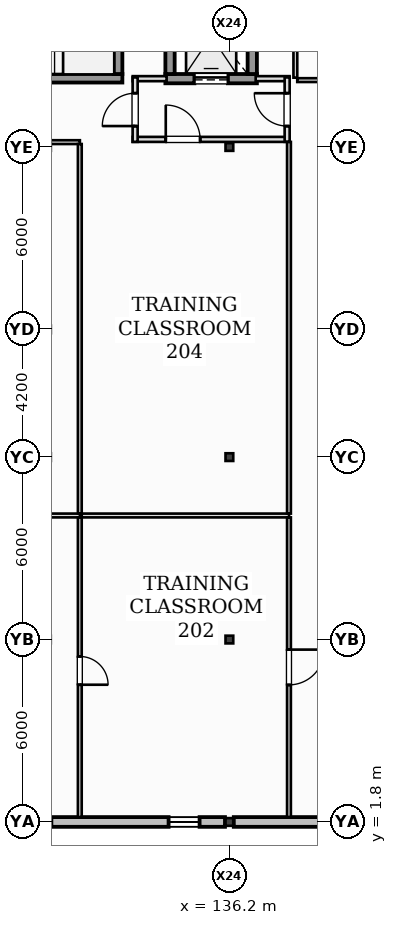
"""IFC4 building model, lengths in metres.
Left out: names, types, materials, properties, quantities, classifications, styles, units other than length and angle.
Written with IfcOpenShell. Run it as: python <this file> out.ifc"""

import sys

from ifc_helpers import new_model, si_unit, direction, frame, frame_2d, origin, origin_2d, place, context, subcontext, project, spatial, rectangle, hollow_rectangle, i_section, extrude, element, fill, save


model = new_model("IFC4")
c1 = context("Model", 3, precision=1e-05, world=origin(), true_north=direction((0.0, 1.0)))
c2 = subcontext(c1, "Body", "Model", "MODEL_VIEW")
j1 = project(units=[si_unit("LENGTHUNIT", "METRE"), si_unit("PLANEANGLEUNIT", "RADIAN")], contexts=[c1])
p1 = place(None, origin())
s1 = spatial("IfcSite", under=j1, at=p1, CompositionType="ELEMENT")
p2 = place(p1, origin())
s2 = spatial("IfcBuilding", under=s1, at=p2, CompositionType="ELEMENT")
p3 = place(p2, frame((0.0, 0.0, 6.0)))
s3 = spatial("IfcBuildingStorey", under=s2, at=p3, CompositionType="ELEMENT", Elevation=6.0)
for number, where, z_axis, x_axis in (
    (1, (136.2, 1.8, 0.0), (0.0, 0.0, 1.0), (1.0, 0.0, 0.0)),
    (2, (136.2, 7.8, 0.0), (0.0, 0.0, 1.0), (1.0, 0.0, 0.0)),
    (3, (136.2, 13.8, 0.0), (0.0, 0.0, 1.0), (1.0, 0.0, 0.0)),
):
    element("IfcColumn", number, at=place(p3, frame(where, z_axis=z_axis, x_axis=x_axis)), inside=s3, PredefinedType="COLUMN", context=c2, shape_type="SweptSolid", body=[
        extrude(i_section(OverallWidth=0.254, OverallDepth=0.253, WebThickness=0.009, FlangeThickness=0.014, at=origin_2d()), origin(), (0.0, 0.0, 1.0), 4.0),
    ])
p4 = place(p3, frame((136.2, 18.0, 0.0), z_axis=(0.0, 0.0, 1.0), x_axis=(1.0, 0.0, 0.0)))
e4 = element("IfcColumn", 4, at=p4, inside=s3, PredefinedType="COLUMN", context=c2, shape_type="SweptSolid", body=[
    extrude(hollow_rectangle(XDim=0.25, YDim=0.25, WallThickness=0.012, at=origin_2d()), origin(), (0.0, 0.0, 1.0), 4.0),
])
p5 = place(p3, frame((136.2, 24.0, 0.0), z_axis=(0.0, 0.0, 1.0), x_axis=(1.0, 0.0, 0.0)))
e5 = element("IfcColumn", 5, at=p5, inside=s3, PredefinedType="COLUMN", context=c2, shape_type="SweptSolid", body=[
    extrude(i_section(OverallWidth=0.254, OverallDepth=0.253, WebThickness=0.009, FlangeThickness=0.014, at=origin_2d()), origin(), (0.0, 0.0, 1.0), 4.0),
])
p6 = place(p3, frame((130.345, 1.8, 0.0), z_axis=(0.0, 0.0, 1.0), x_axis=(1.0, 0.0, 0.0)))
e6 = element("IfcWall", 6, at=p6, inside=s3, PredefinedType="STANDARD", context=c2, shape_type="SweptSolid", body=[
    extrude(rectangle(XDim=5.71, YDim=0.32, at=frame_2d((2.855, 0.0))), origin(), (0.0, 0.0, 1.0), 3.223),
])
p7 = place(p6, frame((3.855, 0.0, 1.28)))
e7 = element("IfcOpeningElement", 7, at=p7, cuts=e6, PredefinedType="OPENING", context=c2, shape_type="SweptSolid", body=[
    extrude(rectangle(XDim=1.02, YDim=1.02, at=frame_2d((0.51, 0.51))), frame((0.0, 0.17, 0.0), z_axis=(0.0, -1.0, 0.0), x_axis=(1.0, 0.0, 0.0)), (0.0, 0.0, 1.0), 0.34),
])
p8 = place(p3, frame((136.345, 1.8, 0.0), z_axis=(0.0, 0.0, 1.0), x_axis=(1.0, 0.0, 0.0)))
e8 = element("IfcWall", 8, at=p8, inside=s3, PredefinedType="STANDARD", context=c2, shape_type="SweptSolid", body=[
    extrude(rectangle(XDim=5.71, YDim=0.32, at=frame_2d((2.855, 0.0))), origin(), (0.0, 0.0, 1.0), 3.223),
])
p9 = place(p8, frame((3.504, 0.0, 0.86)))
e9 = element("IfcOpeningElement", 9, at=p9, cuts=e8, PredefinedType="OPENING", context=c2, shape_type="SweptSolid", body=[
    extrude(rectangle(XDim=1.08, YDim=1.08, at=frame_2d((0.54, 0.54))), frame((0.0, 0.17, 0.0), z_axis=(0.0, -1.0, 0.0), x_axis=(1.0, 0.0, 0.0)), (0.0, 0.0, 1.0), 0.34),
])
p10 = place(p3, frame((124.52, 26.26, 0.0), z_axis=(0.0, 0.0, 1.0), x_axis=(1.0, 0.0, 0.0)))
e10 = element("IfcWall", 10, at=p10, inside=s3, PredefinedType="SHEAR", context=c2, shape_type="SweptSolid", body=[
    extrude(rectangle(XDim=8.16, YDim=0.28, at=frame_2d((4.08, 0.0))), origin(), (0.0, 0.0, 1.0), 4.0),
])
p11 = place(p10, frame((0.65, 0.0, 0.0)))
e11 = element("IfcOpeningElement", 11, at=p11, cuts=e10, PredefinedType="OPENING", context=c2, shape_type="SweptSolid", body=[
    extrude(rectangle(XDim=0.98, YDim=2.15, at=frame_2d((0.49, 1.075))), frame((0.0, 0.15, 0.0), z_axis=(0.0, -1.0, 0.0), x_axis=(1.0, 0.0, 0.0)), (0.0, 0.0, 1.0), 0.3),
])
p12 = place(p3, frame((132.54, 26.4, 0.0), z_axis=(0.0, 0.0, 1.0), x_axis=(0.0, 1.0, 0.0)))
e12 = element("IfcWall", 12, at=p12, inside=s3, PredefinedType="SHEAR", context=c2, shape_type="SweptSolid", body=[
    extrude(rectangle(XDim=3.0, YDim=0.28, at=frame_2d((1.5, 0.0))), origin(), (0.0, 0.0, 1.0), 4.0),
])
p13 = place(p3, frame((134.095, 26.248, 0.0), z_axis=(0.0, 0.0, 1.0), x_axis=(1.0, 0.0, 0.0)))
e13 = element("IfcWall", 13, at=p13, inside=s3, PredefinedType="SHEAR", context=c2, shape_type="SweptSolid", body=[
    extrude(rectangle(XDim=3.01, YDim=0.305, at=frame_2d((1.505, 0.0))), origin(), (0.0, 0.0, 1.0), 4.0),
])
p14 = place(p13, frame((0.955, 0.0, 0.0)))
e14 = element("IfcOpeningElement", 14, at=p14, cuts=e13, PredefinedType="OPENING", context=c2, shape_type="SweptSolid", body=[
    extrude(rectangle(XDim=1.1, YDim=2.15, at=frame_2d((0.55, 1.075))), frame((0.0, 0.162, 0.0), z_axis=(0.0, -1.0, 0.0), x_axis=(1.0, 0.0, 0.0)), (0.0, 0.0, 1.0), 0.325),
])
for number, where, z_axis, x_axis in (
    (15, (134.248, 29.4, 0.0), (0.0, 0.0, 1.0), (0.0, -1.0, 0.0)),
    (16, (136.952, 26.4, 0.0), (0.0, 0.0, 1.0), (0.0, 1.0, 0.0)),
):
    element("IfcWall", number, at=place(p3, frame(where, z_axis=z_axis, x_axis=x_axis)), inside=s3, PredefinedType="SHEAR", context=c2, shape_type="SweptSolid", body=[
        extrude(rectangle(XDim=3.0, YDim=0.305, at=frame_2d((1.5, 0.0))), origin(), (0.0, 0.0, 1.0), 4.0),
    ])
p15 = place(p3, frame((133.02, 24.25, 0.0), z_axis=(0.0, 0.0, 1.0), x_axis=(1.0, 0.0, 0.0)))
e17 = element("IfcWall", 17, at=p15, inside=s3, PredefinedType="PARTITIONING", context=c2, shape_type="SweptSolid", body=[
    extrude(rectangle(XDim=5.16, YDim=0.165, at=frame_2d((2.58, 0.0))), origin(), (0.0, 0.0, 1.0), 3.153),
])
p16 = place(p15, frame((1.087, 0.0, 0.0)))
e18 = element("IfcOpeningElement", 18, at=p16, cuts=e17, PredefinedType="OPENING", context=c2, shape_type="SweptSolid", body=[
    extrude(rectangle(XDim=1.13, YDim=2.18, at=frame_2d((0.565, 1.09))), frame((0.0, 0.093, 0.0), z_axis=(0.0, -1.0, 0.0), x_axis=(1.0, 0.0, 0.0)), (0.0, 0.0, 1.0), 0.185),
])
for number, where, z_axis, x_axis in (
    (19, (133.02, 26.248, 0.0), (0.0, 0.0, 1.0), (1.0, 0.0, 0.0)),
    (20, (137.065, 26.248, 0.0), (0.0, 0.0, 1.0), (1.0, 0.0, 0.0)),
):
    element("IfcWall", number, at=place(p3, frame(where, z_axis=z_axis, x_axis=x_axis)), inside=s3, PredefinedType="PARTITIONING", context=c2, shape_type="SweptSolid", body=[
        extrude(rectangle(XDim=1.115, YDim=0.165, at=frame_2d((0.558, 0.0))), origin(), (0.0, 0.0, 1.0), 3.72),
    ])
p17 = place(p3, frame((133.1, 24.17, 0.0), z_axis=(0.0, 0.0, 1.0), x_axis=(0.0, 1.0, 0.0)))
e21 = element("IfcWall", 21, at=p17, inside=s3, PredefinedType="PARTITIONING", context=c2, shape_type="SweptSolid", body=[
    extrude(rectangle(XDim=2.118, YDim=0.165, at=frame_2d((1.059, 0.0))), origin(), (0.0, 0.0, 1.0), 3.72),
])
p18 = place(p17, frame((0.519, 0.0, 0.0)))
e22 = element("IfcOpeningElement", 22, at=p18, cuts=e21, PredefinedType="OPENING", context=c2, shape_type="SweptSolid", body=[
    extrude(rectangle(XDim=1.08, YDim=2.14, at=frame_2d((0.54, 1.07))), frame((0.0, 0.093, 0.0), z_axis=(0.0, -1.0, 0.0), x_axis=(1.0, 0.0, 0.0)), (0.0, 0.0, 1.0), 0.185),
])
p19 = place(p3, frame((138.1, 24.17, 0.0), z_axis=(0.0, 0.0, 1.0), x_axis=(0.0, 1.0, 0.0)))
e23 = element("IfcWall", 23, at=p19, inside=s3, PredefinedType="PARTITIONING", context=c2, shape_type="SweptSolid", body=[
    extrude(rectangle(XDim=2.118, YDim=0.165, at=frame_2d((1.059, 0.0))), origin(), (0.0, 0.0, 1.0), 3.379),
])
p20 = place(p19, frame((0.519, 0.0, 0.0)))
e24 = element("IfcOpeningElement", 24, at=p20, cuts=e23, PredefinedType="OPENING", context=c2, shape_type="SweptSolid", body=[
    extrude(rectangle(XDim=1.08, YDim=2.14, at=frame_2d((0.54, 1.07))), frame((0.0, 0.093, 0.0), z_axis=(0.0, -1.0, 0.0), x_axis=(1.0, 0.0, 0.0)), (0.0, 0.0, 1.0), 0.185),
])
p21 = place(p3, frame((124.36, 11.88, 0.0), z_axis=(0.0, 0.0, 1.0), x_axis=(1.0, 0.0, 0.0)))
e25 = element("IfcWall", 25, at=p21, inside=s3, PredefinedType="PARTITIONING", context=c2, shape_type="SweptSolid", body=[
    extrude(rectangle(XDim=6.922, YDim=0.125, at=frame_2d((3.461, 0.0))), origin(), (0.0, 0.0, 1.0), 3.72),
])
p22 = place(p3, frame((131.28, 11.817, 0.0), z_axis=(0.0, 0.0, 1.0), x_axis=(0.0, -1.0, 0.0)))
e26 = element("IfcWall", 26, at=p22, inside=s3, PredefinedType="PARTITIONING", context=c2, shape_type="SweptSolid", body=[
    extrude(rectangle(XDim=9.857, YDim=0.125, at=frame_2d((4.929, 0.0))), origin(), (0.0, 0.0, 1.0), 3.72),
])
p23 = place(p22, frame((4.574, 0.0, 0.0)))
e27 = element("IfcOpeningElement", 27, at=p23, cuts=e26, PredefinedType="OPENING", context=c2, shape_type="SweptSolid", body=[
    extrude(rectangle(XDim=0.93, YDim=2.1, at=frame_2d((0.465, 1.05))), frame((0.0, 0.073, 0.0), z_axis=(0.0, -1.0, 0.0), x_axis=(1.0, 0.0, 0.0)), (0.0, 0.0, 1.0), 0.145),
])
p24 = place(p3, frame((131.343, 11.88, 0.0), z_axis=(0.0, 0.0, 1.0), x_axis=(1.0, 0.0, 0.0)))
e28 = element("IfcWall", 28, at=p24, inside=s3, PredefinedType="PARTITIONING", context=c2, shape_type="SweptSolid", body=[
    extrude(rectangle(XDim=6.82, YDim=0.125, at=frame_2d((3.41, 0.0))), origin(), (0.0, 0.0, 1.0), 3.72),
])
p25 = place(p3, frame((138.16, 11.817, 0.0), z_axis=(0.0, 0.0, 1.0), x_axis=(0.0, -1.0, 0.0)))
e29 = element("IfcWall", 29, at=p25, inside=s3, PredefinedType="PARTITIONING", context=c2, shape_type="SweptSolid", body=[
    extrude(rectangle(XDim=9.857, YDim=0.125, at=frame_2d((4.929, 0.0))), origin(), (0.0, 0.0, 1.0), 3.449),
])
p26 = place(p25, frame((4.349, 0.0, 0.0)))
e30 = element("IfcOpeningElement", 30, at=p26, cuts=e29, PredefinedType="OPENING", context=c2, shape_type="SweptSolid", body=[
    extrude(rectangle(XDim=1.16, YDim=2.2, at=frame_2d((0.58, 1.1))), frame((0.0, 0.073, 0.0), z_axis=(0.0, -1.0, 0.0), x_axis=(1.0, 0.0, 0.0)), (0.0, 0.0, 1.0), 0.145),
])
p27 = place(p3, frame((124.417, 24.16, 0.0), z_axis=(0.0, 0.0, 1.0), x_axis=(1.0, 0.0, 0.0)))
e31 = element("IfcWall", 31, at=p27, inside=s3, PredefinedType="PARTITIONING", context=c2, shape_type="SweptSolid", body=[
    extrude(rectangle(XDim=6.865, YDim=0.125, at=frame_2d((3.433, 0.0))), origin(), (0.0, 0.0, 1.0), 3.153),
])
p28 = place(p27, frame((2.87, 0.0, 0.0)))
e32 = element("IfcOpeningElement", 32, at=p28, cuts=e31, PredefinedType="OPENING", context=c2, shape_type="SweptSolid", body=[
    extrude(rectangle(XDim=0.9, YDim=2.1, at=frame_2d((0.45, 1.05))), frame((0.0, 0.073, 0.0), z_axis=(0.0, -1.0, 0.0), x_axis=(1.0, 0.0, 0.0)), (0.0, 0.0, 1.0), 0.145),
])
p29 = place(p3, frame((131.28, 24.097, 0.0), z_axis=(0.0, 0.0, 1.0), x_axis=(0.0, -1.0, 0.0)))
e33 = element("IfcWall", 33, at=p29, inside=s3, PredefinedType="PARTITIONING", context=c2, shape_type="SweptSolid", body=[
    extrude(rectangle(XDim=12.155, YDim=0.125, at=frame_2d((6.078, 0.0))), origin(), (0.0, 0.0, 1.0), 3.72),
])
p30 = place(p3, frame((138.16, 24.167, 0.0), z_axis=(0.0, 0.0, 1.0), x_axis=(0.0, -1.0, 0.0)))
e34 = element("IfcWall", 34, at=p30, inside=s3, PredefinedType="PARTITIONING", context=c2, shape_type="SweptSolid", body=[
    extrude(rectangle(XDim=12.225, YDim=0.125, at=frame_2d((6.113, 0.0))), origin(), (0.0, 0.0, 1.0), 3.289),
])
p31 = place(p3, frame((138.37, 26.28, 0.0), z_axis=(0.0, 0.0, 1.0), x_axis=(0.0, 1.0, 0.0)))
e35 = element("IfcWall", 35, at=p31, inside=s3, PredefinedType="PARTITIONING", context=c2, shape_type="SweptSolid", body=[
    extrude(rectangle(XDim=3.56, YDim=0.125, at=frame_2d((1.78, 0.0))), origin(), (0.0, 0.0, 1.0), 3.379),
])
p32 = place(p3, frame((157.72, 26.2, 0.0), z_axis=(0.0, 0.0, 1.0), x_axis=(-1.0, 0.0, 0.0)))
e36 = element("IfcWall", 36, at=p32, inside=s3, PredefinedType="PARTITIONING", context=c2, shape_type="SweptSolid", body=[
    extrude(rectangle(XDim=19.287, YDim=0.125, at=frame_2d((9.644, 0.0))), origin(), (0.0, 0.0, 1.0), 3.72),
])
p33 = place(p32, frame((9.018, 0.0, 0.0)))
e37 = element("IfcOpeningElement", 37, at=p33, cuts=e36, PredefinedType="OPENING", context=c2, shape_type="SweptSolid", body=[
    extrude(rectangle(XDim=1.03, YDim=2.15, at=frame_2d((0.515, 1.075))), frame((0.0, 0.073, 0.0), z_axis=(0.0, -1.0, 0.0), x_axis=(1.0, 0.0, 0.0)), (0.0, 0.0, 1.0), 0.145),
])
p34 = place(p7, origin())
e38 = element("IfcWindow", 38, at=p34, inside=s3, PartitioningType="SINGLE_PANEL", PredefinedType="WINDOW", context=c2, shape_type="SweptSolid", body=[
    extrude(rectangle(XDim=1.02, YDim=1.02, at=frame_2d((0.51, 0.51))), frame((0.0, 0.03, 0.0), z_axis=(0.0, -1.0, 0.0), x_axis=(1.0, 0.0, 0.0)), (0.0, 0.0, 1.0), 0.06),
])
fill(e7, e38)
p35 = place(p14, origin())
e39 = element("IfcDoor", 39, at=p35, inside=s3, OperationType="SLIDING_TO_LEFT", PredefinedType="DOOR", context=c2, shape_type="SweptSolid", body=[
    extrude(rectangle(XDim=1.1, YDim=2.15, at=frame_2d((0.55, 1.075))), frame((0.0, 0.025, 0.0), z_axis=(0.0, -1.0, 0.0), x_axis=(1.0, 0.0, 0.0)), (0.0, 0.0, 1.0), 0.05),
])
fill(e14, e39)
p36 = place(p18, frame((1.08, 0.0, 0.0), z_axis=(0.0, 0.0, 1.0), x_axis=(-1.0, 0.0, 0.0)))
e40 = element("IfcDoor", 40, at=p36, inside=s3, OperationType="SINGLE_SWING_LEFT", PredefinedType="DOOR", context=c2, shape_type="SweptSolid", body=[
    extrude(rectangle(XDim=1.08, YDim=2.14, at=frame_2d((0.54, 1.07))), frame((0.0, 0.025, 0.0), z_axis=(0.0, -1.0, 0.0), x_axis=(1.0, 0.0, 0.0)), (0.0, 0.0, 1.0), 0.05),
])
fill(e22, e40)
p37 = place(p20, origin())
e41 = element("IfcDoor", 41, at=p37, inside=s3, OperationType="SINGLE_SWING_RIGHT", PredefinedType="DOOR", context=c2, shape_type="SweptSolid", body=[
    extrude(rectangle(XDim=1.08, YDim=2.14, at=frame_2d((0.54, 1.07))), frame((0.0, 0.025, 0.0), z_axis=(0.0, -1.0, 0.0), x_axis=(1.0, 0.0, 0.0)), (0.0, 0.0, 1.0), 0.05),
])
fill(e24, e41)
p38 = place(p23, frame((0.93, 0.0, 0.0), z_axis=(0.0, 0.0, 1.0), x_axis=(-1.0, 0.0, 0.0)))
e42 = element("IfcDoor", 42, at=p38, inside=s3, OperationType="SINGLE_SWING_RIGHT", PredefinedType="DOOR", context=c2, shape_type="SweptSolid", body=[
    extrude(rectangle(XDim=0.93, YDim=2.1, at=frame_2d((0.465, 1.05))), frame((0.0, 0.025, 0.0), z_axis=(0.0, -1.0, 0.0), x_axis=(1.0, 0.0, 0.0)), (0.0, 0.0, 1.0), 0.05),
])
fill(e27, e42)
p39 = place(p26, frame((1.16, 0.0, 0.0), z_axis=(0.0, 0.0, 1.0), x_axis=(-1.0, 0.0, 0.0)))
e43 = element("IfcDoor", 43, at=p39, inside=s3, OperationType="SINGLE_SWING_LEFT", PredefinedType="DOOR", context=c2, shape_type="SweptSolid", body=[
    extrude(rectangle(XDim=1.16, YDim=2.2, at=frame_2d((0.58, 1.1))), frame((0.0, 0.025, 0.0), z_axis=(0.0, -1.0, 0.0), x_axis=(1.0, 0.0, 0.0)), (0.0, 0.0, 1.0), 0.05),
])
fill(e30, e43)
p40 = place(p16, frame((1.13, 0.0, 0.0), z_axis=(0.0, 0.0, 1.0), x_axis=(-1.0, 0.0, 0.0)))
e44 = element("IfcDoor", 44, at=p40, inside=s3, OperationType="SINGLE_SWING_LEFT", PredefinedType="DOOR", context=c2, shape_type="SweptSolid", body=[
    extrude(rectangle(XDim=1.13, YDim=2.18, at=frame_2d((0.565, 1.09))), frame((0.0, 0.025, 0.0), z_axis=(0.0, -1.0, 0.0), x_axis=(1.0, 0.0, 0.0)), (0.0, 0.0, 1.0), 0.05),
])
fill(e18, e44)
save(model, sys.argv[1])
